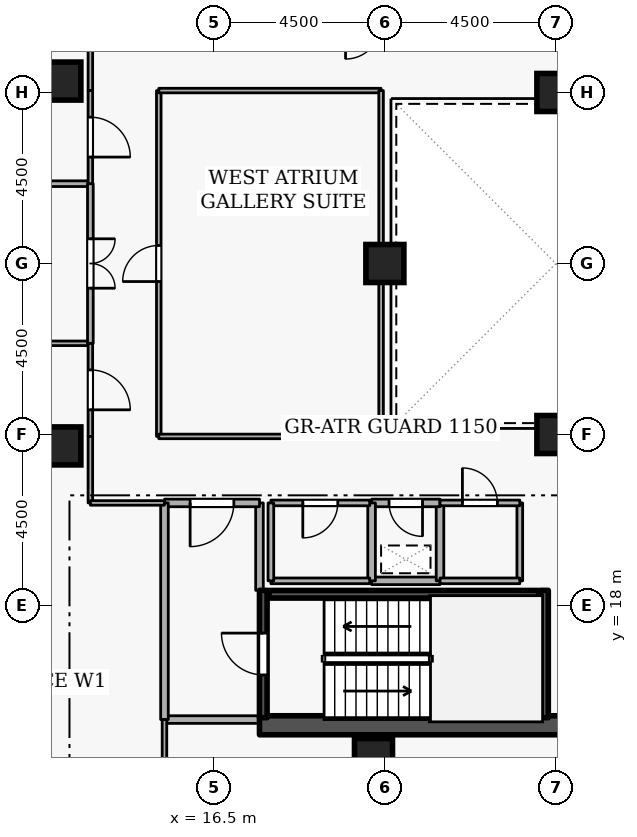
"""IFC4 building model, lengths in metres.
Left out: names, types, materials, properties, quantities, classifications, styles, units other than length and angle.
Written with IfcOpenShell. Run it as: python <this file> out.ifc"""

import sys

from ifc_helpers import new_model, si_unit, direction, frame, frame_2d, origin, origin_2d, place, context, subcontext, project, spatial, rectangle, extrude, element, fill, save


model = new_model("IFC4")
c1 = context("Model", 3, precision=1e-05, world=origin(), true_north=direction((0.0, 1.0)))
c2 = subcontext(c1, "Body", "Model", "MODEL_VIEW")
j1 = project(units=[si_unit("LENGTHUNIT", "METRE"), si_unit("PLANEANGLEUNIT", "RADIAN")], contexts=[c1])
p1 = place(None, origin())
s1 = spatial("IfcSite", under=j1, at=p1, CompositionType="ELEMENT")
p2 = place(p1, origin())
s2 = spatial("IfcBuilding", under=s1, at=p2, CompositionType="ELEMENT")
p3 = place(p2, frame((0.0, 0.0, 207.3)))
s3 = spatial("IfcBuildingStorey", under=s2, at=p3, CompositionType="ELEMENT", Elevation=207.3)
p4 = place(p3, frame((17.7, 14.85, 0.0), z_axis=(0.0, 0.0, 1.0), x_axis=(1.0, 0.0, 0.0)))
e1 = element("IfcWall", 1, at=p4, inside=s3, PredefinedType="SHEAR", context=c2, shape_type="SweptSolid", body=[
    extrude(rectangle(XDim=15.6, YDim=0.5, at=frame_2d((7.8, 0.0))), origin(), (0.0, 0.0, 1.0), 3.6),
])
for number, where, z_axis, x_axis in (
    (2, (12.5, 22.2, 0.0), (0.0, 0.0, 1.0), (1.0, 0.0, 0.0)),
    (3, (12.5, 31.8, 0.0), (0.0, 0.0, 1.0), (1.0, 0.0, 0.0)),
    (4, (20.7, 14.0, 0.0), (0.0, 0.0, 1.0), (1.0, 0.0, 0.0)),
    (5, (25.5, 22.5, 0.0), (0.0, 0.0, 1.0), (1.0, 0.0, 0.0)),
    (6, (25.5, 31.5, 0.0), (0.0, 0.0, 1.0), (1.0, 0.0, 0.0)),
    (7, (21.0, 27.0, 0.0), (0.0, 0.0, 1.0), (1.0, 0.0, 0.0)),
):
    element("IfcColumn", number, at=place(p3, frame(where, z_axis=z_axis, x_axis=x_axis)), inside=s3, PredefinedType="COLUMN", context=c2, shape_type="SweptSolid", body=[
        extrude(rectangle(XDim=1.0, YDim=1.0, at=origin_2d()), origin(), (0.0, 0.0, 1.0), 3.6),
    ])
p5 = place(p3, frame((17.8, 15.05, 0.0), z_axis=(0.0, 0.0, 1.0), x_axis=(0.0, 1.0, 0.0)))
e8 = element("IfcWall", 8, at=p5, inside=s3, PredefinedType="SHEAR", context=c2, shape_type="SweptSolid", body=[
    extrude(rectangle(XDim=3.35, YDim=0.2, at=frame_2d((1.675, 0.0))), origin(), (0.0, 0.0, 1.0), 3.6),
])
p6 = place(p5, frame((1.125, 0.0, 0.0)))
e9 = element("IfcOpeningElement", 9, at=p6, cuts=e8, PredefinedType="OPENING", context=c2, shape_type="SweptSolid", body=[
    extrude(rectangle(XDim=1.1, YDim=2.1, at=frame_2d((0.55, 1.05))), frame((0.0, 0.11, 0.0), z_axis=(0.0, -1.0, 0.0), x_axis=(1.0, 0.0, 0.0)), (0.0, 0.0, 1.0), 0.22),
])
p7 = place(p3, frame((25.2, 18.4, 0.0), z_axis=(0.0, 0.0, 1.0), x_axis=(0.0, -1.0, 0.0)))
e10 = element("IfcWall", 10, at=p7, inside=s3, PredefinedType="SHEAR", context=c2, shape_type="SweptSolid", body=[
    extrude(rectangle(XDim=3.35, YDim=0.2, at=frame_2d((1.675, 0.0))), origin(), (0.0, 0.0, 1.0), 3.6),
])
p8 = place(p3, frame((25.05, 18.297, 0.0), z_axis=(0.0, 0.0, 1.0), x_axis=(-1.0, 0.0, 0.0)))
e11 = element("IfcWall", 11, at=p8, inside=s3, PredefinedType="SHEAR", context=c2, shape_type="SweptSolid", body=[
    extrude(rectangle(XDim=7.1, YDim=0.2, at=frame_2d((3.55, 0.0))), origin(), (0.0, 0.0, 1.0), 3.6),
])
p9 = place(p3, frame((15.2, 15.0, 0.0), z_axis=(0.0, 0.0, 1.0), x_axis=(1.0, 0.0, 0.0)))
e12 = element("IfcWall", 12, at=p9, inside=s3, PredefinedType="STANDARD", context=c2, shape_type="SweptSolid", body=[
    extrude(rectangle(XDim=2.5, YDim=0.2, at=frame_2d((1.25, 0.0))), origin(), (0.0, 0.0, 1.0), 3.34),
])
p10 = place(p3, frame((17.7, 18.4, 0.0), z_axis=(0.0, 0.0, 1.0), x_axis=(0.0, 1.0, 0.0)))
e13 = element("IfcWall", 13, at=p10, inside=s3, PredefinedType="STANDARD", context=c2, shape_type="SweptSolid", body=[
    extrude(rectangle(XDim=2.3, YDim=0.2, at=frame_2d((1.15, 0.0))), origin(), (0.0, 0.0, 1.0), 2.545),
])
p11 = place(p3, frame((17.7, 20.7, 0.0), z_axis=(0.0, 0.0, 1.0), x_axis=(-1.0, 0.0, 0.0)))
e14 = element("IfcWall", 14, at=p11, inside=s3, PredefinedType="STANDARD", context=c2, shape_type="SweptSolid", body=[
    extrude(rectangle(XDim=2.5, YDim=0.2, at=frame_2d((1.25, 0.0))), origin(), (0.0, 0.0, 1.0), 3.34),
])
p12 = place(p11, frame((0.675, 0.0, 0.0)))
e15 = element("IfcOpeningElement", 15, at=p12, cuts=e14, PredefinedType="OPENING", context=c2, shape_type="SweptSolid", body=[
    extrude(rectangle(XDim=1.15, YDim=2.1, at=frame_2d((0.575, 1.05))), frame((0.0, 0.11, 0.0), z_axis=(0.0, -1.0, 0.0), x_axis=(1.0, 0.0, 0.0)), (0.0, 0.0, 1.0), 0.22),
])
p13 = place(p3, frame((15.2, 20.7, 0.0), z_axis=(0.0, 0.0, 1.0), x_axis=(0.0, -1.0, 0.0)))
e16 = element("IfcWall", 16, at=p13, inside=s3, PredefinedType="STANDARD", context=c2, shape_type="SweptSolid", body=[
    extrude(rectangle(XDim=5.7, YDim=0.2, at=frame_2d((2.85, 0.0))), origin(), (0.0, 0.0, 1.0), 3.34),
])
p14 = place(p3, frame((20.65, 18.65, 0.0), z_axis=(0.0, 0.0, 1.0), x_axis=(1.0, 0.0, 0.0)))
e17 = element("IfcWall", 17, at=p14, inside=s3, PredefinedType="STANDARD", context=c2, shape_type="SweptSolid", body=[
    extrude(rectangle(XDim=1.8, YDim=0.2, at=frame_2d((0.9, 0.0))), origin(), (0.0, 0.0, 1.0), 3.34),
])
p15 = place(p3, frame((22.45, 18.65, 0.0), z_axis=(0.0, 0.0, 1.0), x_axis=(0.0, 1.0, 0.0)))
e18 = element("IfcWall", 18, at=p15, inside=s3, PredefinedType="STANDARD", context=c2, shape_type="SweptSolid", body=[
    extrude(rectangle(XDim=2.05, YDim=0.2, at=frame_2d((1.025, 0.0))), origin(), (0.0, 0.0, 1.0), 3.34),
])
p16 = place(p3, frame((22.45, 20.7, 0.0), z_axis=(0.0, 0.0, 1.0), x_axis=(-1.0, 0.0, 0.0)))
e19 = element("IfcWall", 19, at=p16, inside=s3, PredefinedType="STANDARD", context=c2, shape_type="SweptSolid", body=[
    extrude(rectangle(XDim=1.8, YDim=0.2, at=frame_2d((0.9, 0.0))), origin(), (0.0, 0.0, 1.0), 3.34),
])
p17 = place(p16, frame((0.46, 0.0, 0.0)))
e20 = element("IfcOpeningElement", 20, at=p17, cuts=e19, PredefinedType="OPENING", context=c2, shape_type="SweptSolid", body=[
    extrude(rectangle(XDim=0.88, YDim=2.04, at=frame_2d((0.44, 1.02))), frame((0.0, 0.11, 0.0), z_axis=(0.0, -1.0, 0.0), x_axis=(1.0, 0.0, 0.0)), (0.0, 0.0, 1.0), 0.22),
])
p18 = place(p3, frame((20.65, 20.7, 0.0), z_axis=(0.0, 0.0, 1.0), x_axis=(0.0, -1.0, 0.0)))
e21 = element("IfcWall", 21, at=p18, inside=s3, PredefinedType="STANDARD", context=c2, shape_type="SweptSolid", body=[
    extrude(rectangle(XDim=2.05, YDim=0.2, at=frame_2d((1.025, 0.0))), origin(), (0.0, 0.0, 1.0), 3.34),
])
p19 = place(p3, frame((18.0, 18.65, 0.0), z_axis=(0.0, 0.0, 1.0), x_axis=(1.0, 0.0, 0.0)))
e22 = element("IfcWall", 22, at=p19, inside=s3, PredefinedType="PARTITIONING", context=c2, shape_type="SweptSolid", body=[
    extrude(rectangle(XDim=2.6, YDim=0.15, at=frame_2d((1.3, 0.0))), origin(), (0.0, 0.0, 1.0), 3.34),
])
p20 = place(p3, frame((20.6, 20.7, 0.0), z_axis=(0.0, 0.0, 1.0), x_axis=(-1.0, 0.0, 0.0)))
e23 = element("IfcWall", 23, at=p20, inside=s3, PredefinedType="PARTITIONING", context=c2, shape_type="SweptSolid", body=[
    extrude(rectangle(XDim=2.6, YDim=0.15, at=frame_2d((1.3, 0.0))), origin(), (0.0, 0.0, 1.0), 3.34),
])
p21 = place(p20, frame((0.84, 0.0, 0.0)))
e24 = element("IfcOpeningElement", 24, at=p21, cuts=e23, PredefinedType="OPENING", context=c2, shape_type="SweptSolid", body=[
    extrude(rectangle(XDim=0.92, YDim=2.08, at=frame_2d((0.46, 1.04))), frame((0.0, 0.085, 0.0), z_axis=(0.0, -1.0, 0.0), x_axis=(1.0, 0.0, 0.0)), (0.0, 0.0, 1.0), 0.17),
])
p22 = place(p3, frame((18.0, 20.7, 0.0), z_axis=(0.0, 0.0, 1.0), x_axis=(0.0, -1.0, 0.0)))
e25 = element("IfcWall", 25, at=p22, inside=s3, PredefinedType="PARTITIONING", context=c2, shape_type="SweptSolid", body=[
    extrude(rectangle(XDim=2.05, YDim=0.15, at=frame_2d((1.025, 0.0))), origin(), (0.0, 0.0, 1.0), 2.545),
])
p23 = place(p3, frame((24.55, 20.7, 0.0), z_axis=(0.0, 0.0, 1.0), x_axis=(0.0, -1.0, 0.0)))
e26 = element("IfcWall", 26, at=p23, inside=s3, PredefinedType="PARTITIONING", context=c2, shape_type="SweptSolid", body=[
    extrude(rectangle(XDim=2.05, YDim=0.15, at=frame_2d((1.025, 0.0))), origin(), (0.0, 0.0, 1.0), 3.34),
])
p24 = place(p3, frame((24.55, 18.65, 0.0), z_axis=(0.0, 0.0, 1.0), x_axis=(-1.0, 0.0, 0.0)))
e27 = element("IfcWall", 27, at=p24, inside=s3, PredefinedType="PARTITIONING", context=c2, shape_type="SweptSolid", body=[
    extrude(rectangle(XDim=2.1, YDim=0.15, at=frame_2d((1.05, 0.0))), origin(), (0.0, 0.0, 1.0), 3.34),
])
p25 = place(p3, frame((22.45, 20.7, 0.0), z_axis=(0.0, 0.0, 1.0), x_axis=(1.0, 0.0, 0.0)))
e28 = element("IfcWall", 28, at=p25, inside=s3, PredefinedType="PARTITIONING", context=c2, shape_type="SweptSolid", body=[
    extrude(rectangle(XDim=2.1, YDim=0.15, at=frame_2d((1.05, 0.0))), origin(), (0.0, 0.0, 1.0), 3.34),
])
p26 = place(p25, frame((0.59, 0.0, 0.0)))
e29 = element("IfcOpeningElement", 29, at=p26, cuts=e28, PredefinedType="OPENING", context=c2, shape_type="SweptSolid", body=[
    extrude(rectangle(XDim=0.92, YDim=2.08, at=frame_2d((0.46, 1.04))), frame((0.0, 0.085, 0.0), z_axis=(0.0, -1.0, 0.0), x_axis=(1.0, 0.0, 0.0)), (0.0, 0.0, 1.0), 0.17),
])
p27 = place(p3, frame((1.78, 24.9, 0.0), z_axis=(0.0, 0.0, 1.0), x_axis=(1.0, 0.0, 0.0)))
e30 = element("IfcWall", 30, at=p27, inside=s3, PredefinedType="PARTITIONING", context=c2, shape_type="SweptSolid", body=[
    extrude(rectangle(XDim=11.47, YDim=0.12, at=frame_2d((5.735, 0.0))), origin(), (0.0, 0.0, 1.0), 3.34),
])
p28 = place(p3, frame((13.25, 24.9, 0.0), z_axis=(0.0, 0.0, 1.0), x_axis=(0.0, -1.0, 0.0)))
e31 = element("IfcWall", 31, at=p28, inside=s3, PredefinedType="PARTITIONING", context=c2, shape_type="SweptSolid", body=[
    extrude(rectangle(XDim=2.45, YDim=0.12, at=frame_2d((1.225, 0.0))), origin(), (0.0, 0.0, 1.0), 3.34),
])
p29 = place(p28, frame((0.7, 0.0, 0.0)))
e32 = element("IfcOpeningElement", 32, at=p29, cuts=e31, PredefinedType="OPENING", context=c2, shape_type="SweptSolid", body=[
    extrude(rectangle(XDim=1.05, YDim=2.1, at=frame_2d((0.525, 1.05))), frame((0.0, 0.07, 0.0), z_axis=(0.0, -1.0, 0.0), x_axis=(1.0, 0.0, 0.0)), (0.0, 0.0, 1.0), 0.14),
])
p30 = place(p3, frame((13.25, 22.45, 0.0), z_axis=(0.0, 0.0, 1.0), x_axis=(0.0, -1.0, 0.0)))
e33 = element("IfcWall", 33, at=p30, inside=s3, PredefinedType="PARTITIONING", context=c2, shape_type="SweptSolid", body=[
    extrude(rectangle(XDim=1.75, YDim=0.12, at=frame_2d((0.875, 0.0))), origin(), (0.0, 0.0, 1.0), 3.34),
])
p31 = place(p3, frame((13.25, 20.7, 0.0), z_axis=(0.0, 0.0, 1.0), x_axis=(1.0, 0.0, 0.0)))
e34 = element("IfcWall", 34, at=p31, inside=s3, PredefinedType="PARTITIONING", context=c2, shape_type="SweptSolid", body=[
    extrude(rectangle(XDim=1.95, YDim=0.12, at=frame_2d((0.975, 0.0))), origin(), (0.0, 0.0, 1.0), 3.34),
])
p32 = place(p3, frame((15.2, 15.0, 0.0), z_axis=(0.0, 0.0, 1.0), x_axis=(0.0, -1.0, 0.0)))
e35 = element("IfcWall", 35, at=p32, inside=s3, PredefinedType="PARTITIONING", context=c2, shape_type="SweptSolid", body=[
    extrude(rectangle(XDim=5.72, YDim=0.12, at=frame_2d((2.86, 0.0))), origin(), (0.0, 0.0, 1.0), 3.34),
])
p33 = place(p3, frame((1.78, 29.1, 0.0), z_axis=(0.0, 0.0, 1.0), x_axis=(1.0, 0.0, 0.0)))
e36 = element("IfcWall", 36, at=p33, inside=s3, PredefinedType="PARTITIONING", context=c2, shape_type="SweptSolid", body=[
    extrude(rectangle(XDim=11.47, YDim=0.15, at=frame_2d((5.735, 0.0))), origin(), (0.0, 0.0, 1.0), 3.34),
])
p34 = place(p3, frame((13.25, 29.1, 0.0), z_axis=(0.0, 0.0, 1.0), x_axis=(0.0, -1.0, 0.0)))
e37 = element("IfcWall", 37, at=p34, inside=s3, PredefinedType="PARTITIONING", context=c2, shape_type="SweptSolid", body=[
    extrude(rectangle(XDim=4.2, YDim=0.15, at=frame_2d((2.1, 0.0))), origin(), (0.0, 0.0, 1.0), 3.34),
])
p35 = place(p34, frame((1.45, 0.0, 0.0)))
e38 = element("IfcOpeningElement", 38, at=p35, cuts=e37, PredefinedType="OPENING", context=c2, shape_type="SweptSolid", body=[
    extrude(rectangle(XDim=1.3, YDim=2.12, at=frame_2d((0.65, 1.06))), frame((0.0, 0.085, 0.0), z_axis=(0.0, -1.0, 0.0), x_axis=(1.0, 0.0, 0.0)), (0.0, 0.0, 1.0), 0.17),
])
p36 = place(p3, frame((13.25, 33.3, 0.0), z_axis=(0.0, 0.0, 1.0), x_axis=(0.0, -1.0, 0.0)))
e39 = element("IfcWall", 39, at=p36, inside=s3, PredefinedType="PARTITIONING", context=c2, shape_type="SweptSolid", body=[
    extrude(rectangle(XDim=1.75, YDim=0.12, at=frame_2d((0.875, 0.0))), origin(), (0.0, 0.0, 1.0), 3.34),
])
p37 = place(p3, frame((13.25, 31.55, 0.0), z_axis=(0.0, 0.0, 1.0), x_axis=(0.0, -1.0, 0.0)))
e40 = element("IfcWall", 40, at=p37, inside=s3, PredefinedType="PARTITIONING", context=c2, shape_type="SweptSolid", body=[
    extrude(rectangle(XDim=2.45, YDim=0.12, at=frame_2d((1.225, 0.0))), origin(), (0.0, 0.0, 1.0), 3.34),
])
p38 = place(p37, frame((0.7, 0.0, 0.0)))
e41 = element("IfcOpeningElement", 41, at=p38, cuts=e40, PredefinedType="OPENING", context=c2, shape_type="SweptSolid", body=[
    extrude(rectangle(XDim=1.05, YDim=2.1, at=frame_2d((0.525, 1.05))), frame((0.0, 0.07, 0.0), z_axis=(0.0, -1.0, 0.0), x_axis=(1.0, 0.0, 0.0)), (0.0, 0.0, 1.0), 0.14),
])
p39 = place(p3, frame((15.05, 22.45, 0.0), z_axis=(0.0, 0.0, 1.0), x_axis=(0.0, 1.0, 0.0)))
e42 = element("IfcWall", 42, at=p39, inside=s3, PredefinedType="PARTITIONING", context=c2, shape_type="SweptSolid", body=[
    extrude(rectangle(XDim=9.1, YDim=0.12, at=frame_2d((4.55, 0.0))), origin(), (0.0, 0.0, 1.0), 3.34),
])
p40 = place(p39, frame((4.075, 0.0, 0.0)))
e43 = element("IfcOpeningElement", 43, at=p40, cuts=e42, PredefinedType="OPENING", context=c2, shape_type="SweptSolid", body=[
    extrude(rectangle(XDim=0.95, YDim=2.1, at=frame_2d((0.475, 1.05))), frame((0.0, 0.07, 0.0), z_axis=(0.0, -1.0, 0.0), x_axis=(1.0, 0.0, 0.0)), (0.0, 0.0, 1.0), 0.14),
])
p41 = place(p3, frame((15.05, 31.55, 0.0), z_axis=(0.0, 0.0, 1.0), x_axis=(1.0, 0.0, 0.0)))
e44 = element("IfcWall", 44, at=p41, inside=s3, PredefinedType="PARTITIONING", context=c2, shape_type="SweptSolid", body=[
    extrude(rectangle(XDim=5.85, YDim=0.12, at=frame_2d((2.925, 0.0))), origin(), (0.0, 0.0, 1.0), 3.34),
])
p42 = place(p3, frame((20.9, 31.55, 0.0), z_axis=(0.0, 0.0, 1.0), x_axis=(0.0, -1.0, 0.0)))
e45 = element("IfcWall", 45, at=p42, inside=s3, PredefinedType="PARTITIONING", context=c2, shape_type="SweptSolid", body=[
    extrude(rectangle(XDim=9.1, YDim=0.12, at=frame_2d((4.55, 0.0))), origin(), (0.0, 0.0, 1.0), 3.34),
])
p43 = place(p3, frame((20.9, 22.45, 0.0), z_axis=(0.0, 0.0, 1.0), x_axis=(-1.0, 0.0, 0.0)))
e46 = element("IfcWall", 46, at=p43, inside=s3, PredefinedType="PARTITIONING", context=c2, shape_type="SweptSolid", body=[
    extrude(rectangle(XDim=5.85, YDim=0.12, at=frame_2d((2.925, 0.0))), origin(), (0.0, 0.0, 1.0), 3.34),
])
p44 = place(p6, origin())
e47 = element("IfcDoor", 47, at=p44, inside=s3, OperationType="SINGLE_SWING_RIGHT", PredefinedType="DOOR", context=c2, shape_type="SweptSolid", body=[
    extrude(rectangle(XDim=1.1, YDim=2.1, at=frame_2d((0.55, 1.05))), frame((0.0, 0.025, 0.0), z_axis=(0.0, -1.0, 0.0), x_axis=(1.0, 0.0, 0.0)), (0.0, 0.0, 1.0), 0.05),
])
fill(e9, e47)
p45 = place(p12, origin())
e48 = element("IfcDoor", 48, at=p45, inside=s3, OperationType="SINGLE_SWING_RIGHT", PredefinedType="DOOR", context=c2, shape_type="SweptSolid", body=[
    extrude(rectangle(XDim=1.15, YDim=2.1, at=frame_2d((0.575, 1.05))), frame((0.0, 0.025, 0.0), z_axis=(0.0, -1.0, 0.0), x_axis=(1.0, 0.0, 0.0)), (0.0, 0.0, 1.0), 0.05),
])
fill(e15, e48)
p46 = place(p17, origin())
e49 = element("IfcDoor", 49, at=p46, inside=s3, OperationType="SINGLE_SWING_LEFT", PredefinedType="DOOR", context=c2, shape_type="SweptSolid", body=[
    extrude(rectangle(XDim=0.88, YDim=2.04, at=frame_2d((0.44, 1.02))), frame((0.0, 0.025, 0.0), z_axis=(0.0, -1.0, 0.0), x_axis=(1.0, 0.0, 0.0)), (0.0, 0.0, 1.0), 0.05),
])
fill(e20, e49)
p47 = place(p21, origin())
e50 = element("IfcDoor", 50, at=p47, inside=s3, OperationType="SINGLE_SWING_RIGHT", PredefinedType="DOOR", context=c2, shape_type="SweptSolid", body=[
    extrude(rectangle(XDim=0.92, YDim=2.08, at=frame_2d((0.46, 1.04))), frame((0.0, 0.025, 0.0), z_axis=(0.0, -1.0, 0.0), x_axis=(1.0, 0.0, 0.0)), (0.0, 0.0, 1.0), 0.05),
])
fill(e24, e50)
p48 = place(p26, origin())
e51 = element("IfcDoor", 51, at=p48, inside=s3, OperationType="SINGLE_SWING_LEFT", PredefinedType="DOOR", context=c2, shape_type="SweptSolid", body=[
    extrude(rectangle(XDim=0.92, YDim=2.08, at=frame_2d((0.46, 1.04))), frame((0.0, 0.025, 0.0), z_axis=(0.0, -1.0, 0.0), x_axis=(1.0, 0.0, 0.0)), (0.0, 0.0, 1.0), 0.05),
])
fill(e29, e51)
p49 = place(p29, origin())
e52 = element("IfcDoor", 52, at=p49, inside=s3, OperationType="SINGLE_SWING_RIGHT", PredefinedType="DOOR", context=c2, shape_type="SweptSolid", body=[
    extrude(rectangle(XDim=1.05, YDim=2.1, at=frame_2d((0.525, 1.05))), frame((0.0, 0.025, 0.0), z_axis=(0.0, -1.0, 0.0), x_axis=(1.0, 0.0, 0.0)), (0.0, 0.0, 1.0), 0.05),
])
fill(e32, e52)
p50 = place(p35, origin())
e53 = element("IfcDoor", 53, at=p50, inside=s3, OperationType="DOUBLE_DOOR_SINGLE_SWING", PredefinedType="DOOR", context=c2, shape_type="SweptSolid", body=[
    extrude(rectangle(XDim=1.3, YDim=2.12, at=frame_2d((0.65, 1.06))), frame((0.0, 0.025, 0.0), z_axis=(0.0, -1.0, 0.0), x_axis=(1.0, 0.0, 0.0)), (0.0, 0.0, 1.0), 0.05),
])
fill(e38, e53)
p51 = place(p38, origin())
e54 = element("IfcDoor", 54, at=p51, inside=s3, OperationType="SINGLE_SWING_RIGHT", PredefinedType="DOOR", context=c2, shape_type="SweptSolid", body=[
    extrude(rectangle(XDim=1.05, YDim=2.1, at=frame_2d((0.525, 1.05))), frame((0.0, 0.025, 0.0), z_axis=(0.0, -1.0, 0.0), x_axis=(1.0, 0.0, 0.0)), (0.0, 0.0, 1.0), 0.05),
])
fill(e41, e54)
p52 = place(p40, origin())
e55 = element("IfcDoor", 55, at=p52, inside=s3, OperationType="SINGLE_SWING_LEFT", PredefinedType="DOOR", context=c2, shape_type="SweptSolid", body=[
    extrude(rectangle(XDim=0.95, YDim=2.1, at=frame_2d((0.475, 1.05))), frame((0.0, 0.025, 0.0), z_axis=(0.0, -1.0, 0.0), x_axis=(1.0, 0.0, 0.0)), (0.0, 0.0, 1.0), 0.05),
])
fill(e43, e55)
save(model, sys.argv[1])
